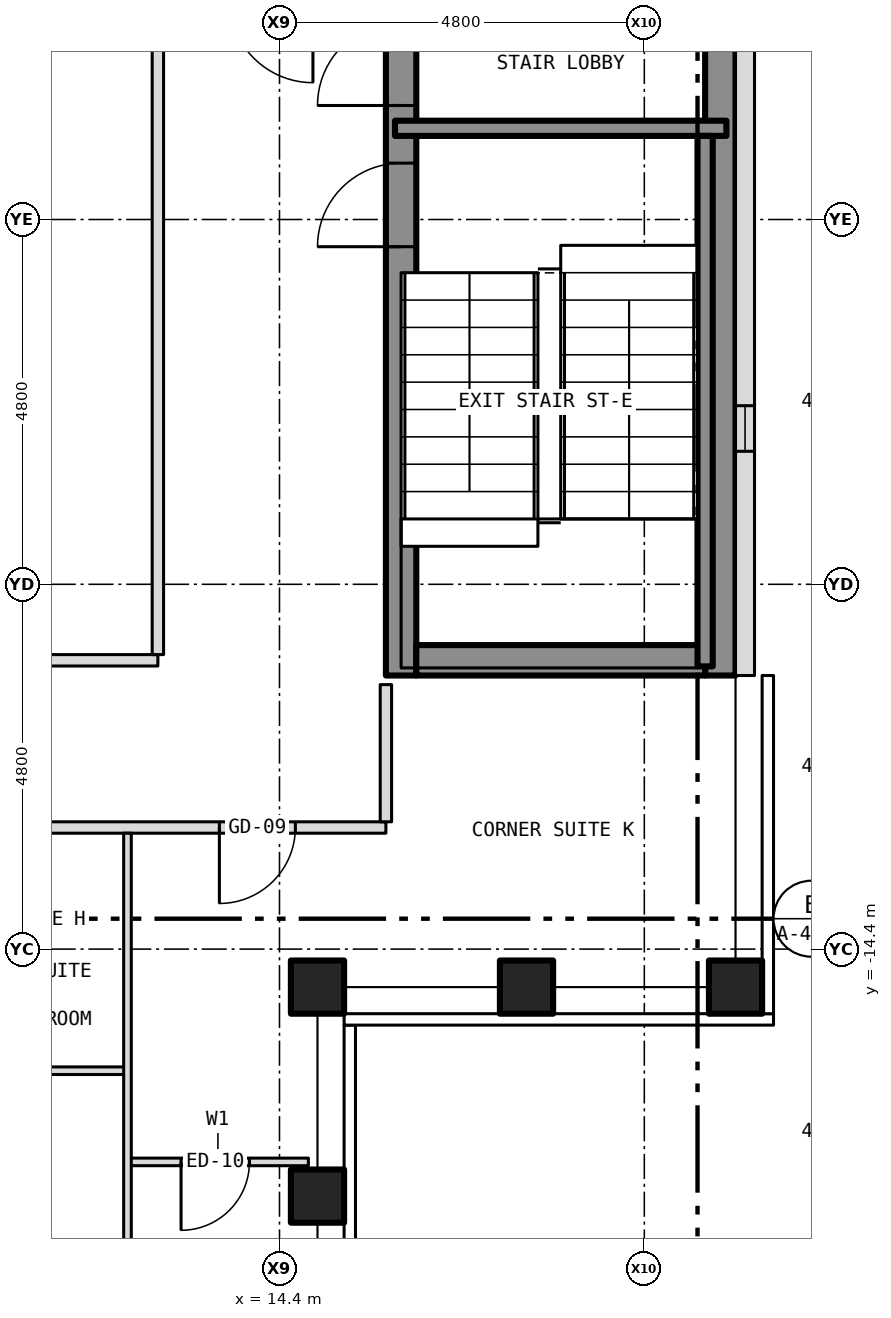
"""IFC4 building model, lengths in metres.
Left out: names, types, materials, properties, quantities, classifications, styles, units other than length and angle.
Written with IfcOpenShell. Run it as: python <this file> out.ifc"""

import sys

from ifc_helpers import new_model, si_unit, direction, frame, frame_2d, origin, origin_2d, place, context, subcontext, project, spatial, rectangle, hollow_rectangle, extrude, element, fill, save


model = new_model("IFC4")
c1 = context("Model", 3, precision=1e-05, world=origin(), true_north=direction((0.0, 1.0)))
c2 = subcontext(c1, "Body", "Model", "MODEL_VIEW")
j1 = project(units=[si_unit("LENGTHUNIT", "METRE"), si_unit("PLANEANGLEUNIT", "RADIAN")], contexts=[c1])
p1 = place(None, origin())
s1 = spatial("IfcSite", under=j1, at=p1, CompositionType="ELEMENT")
p2 = place(p1, origin())
s2 = spatial("IfcBuilding", under=s1, at=p2, CompositionType="ELEMENT")
p3 = place(p2, frame((0.0, 0.0, 212.0)))
s3 = spatial("IfcBuildingStorey", under=s2, at=p3, CompositionType="ELEMENT", Elevation=212.0)
for number, where, z_axis, x_axis in (
    (1, (20.4, -14.9, -0.15), (0.0, 0.0, 1.0), (1.0, 0.0, 0.0)),
    (2, (14.9, -14.9, -0.15), (0.0, 0.0, 1.0), (1.0, 0.0, 0.0)),
    (3, (14.9, -17.65, -0.15), (0.0, 0.0, 1.0), (1.0, 0.0, 0.0)),
    (4, (17.65, -14.9, -0.15), (0.0, 0.0, 1.0), (1.0, 0.0, 0.0)),
):
    element("IfcColumn", number, at=place(p3, frame(where, z_axis=z_axis, x_axis=x_axis)), inside=s3, PredefinedType="COLUMN", context=c2, shape_type="SweptSolid", body=[
        extrude(hollow_rectangle(XDim=0.7, YDim=0.7, WallThickness=0.04, at=origin_2d()), origin(), (0.0, 0.0, 1.0), 3.5),
    ])
p4 = place(p3, frame((16.0, -10.8, 0.0), z_axis=(0.0, 0.0, 1.0), x_axis=(0.0, 1.0, 0.0)))
e5 = element("IfcWall", 5, at=p4, inside=s3, PredefinedType="SHEAR", context=c2, shape_type="SweptSolid", body=[
    extrude(rectangle(XDim=21.6, YDim=0.4, at=frame_2d((10.8, 0.0))), origin(), (0.0, 0.0, 1.0), 3.25),
])
p5 = place(p4, frame((9.4, 0.0, 0.0)))
e6 = element("IfcOpeningElement", 6, at=p5, cuts=e5, PredefinedType="OPENING", context=c2, shape_type="SweptSolid", body=[
    extrude(rectangle(XDim=1.1, YDim=2.1, at=frame_2d((0.55, 1.05))), frame((0.0, 0.212, 0.0), z_axis=(0.0, -1.0, 0.0), x_axis=(1.0, 0.0, 0.0)), (0.0, 0.0, 1.0), 0.424),
])
p6 = place(p4, frame((11.5, 0.0, 0.0)))
e7 = element("IfcOpeningElement", 7, at=p6, cuts=e5, PredefinedType="OPENING", context=c2, shape_type="SweptSolid", body=[
    extrude(rectangle(XDim=1.1, YDim=2.1, at=frame_2d((0.55, 1.05))), frame((0.0, 0.212, 0.0), z_axis=(0.0, -1.0, 0.0), x_axis=(1.0, 0.0, 0.0)), (0.0, 0.0, 1.0), 0.424),
])
p7 = place(p4, frame((13.6, 0.0, 0.0)))
e8 = element("IfcOpeningElement", 8, at=p7, cuts=e5, PredefinedType="OPENING", context=c2, shape_type="SweptSolid", body=[
    extrude(rectangle(XDim=1.1, YDim=2.1, at=frame_2d((0.55, 1.05))), frame((0.0, 0.212, 0.0), z_axis=(0.0, -1.0, 0.0), x_axis=(1.0, 0.0, 0.0)), (0.0, 0.0, 1.0), 0.424),
])
p8 = place(p4, frame((15.7, 0.0, 0.0)))
e9 = element("IfcOpeningElement", 9, at=p8, cuts=e5, PredefinedType="OPENING", context=c2, shape_type="SweptSolid", body=[
    extrude(rectangle(XDim=1.1, YDim=2.1, at=frame_2d((0.55, 1.05))), frame((0.0, 0.212, 0.0), z_axis=(0.0, -1.0, 0.0), x_axis=(1.0, 0.0, 0.0)), (0.0, 0.0, 1.0), 0.424),
])
p9 = place(p4, frame((17.8, 0.0, 0.0)))
e10 = element("IfcOpeningElement", 10, at=p9, cuts=e5, PredefinedType="OPENING", context=c2, shape_type="SweptSolid", body=[
    extrude(rectangle(XDim=1.1, YDim=2.1, at=frame_2d((0.55, 1.05))), frame((0.0, 0.212, 0.0), z_axis=(0.0, -1.0, 0.0), x_axis=(1.0, 0.0, 0.0)), (0.0, 0.0, 1.0), 0.424),
])
p10 = place(p4, frame((5.642, 0.0, 0.0)))
e11 = element("IfcOpeningElement", 11, at=p10, cuts=e5, PredefinedType="OPENING", context=c2, shape_type="SweptSolid", body=[
    extrude(rectangle(XDim=1.1, YDim=2.1, at=frame_2d((0.55, 1.05))), frame((0.0, 0.212, 0.0), z_axis=(0.0, -1.0, 0.0), x_axis=(1.0, 0.0, 0.0)), (0.0, 0.0, 1.0), 0.424),
])
p11 = place(p4, frame((7.5, 0.0, 0.0)))
e12 = element("IfcOpeningElement", 12, at=p11, cuts=e5, PredefinedType="OPENING", context=c2, shape_type="SweptSolid", body=[
    extrude(rectangle(XDim=1.1, YDim=2.1, at=frame_2d((0.55, 1.05))), frame((0.0, 0.212, 0.0), z_axis=(0.0, -1.0, 0.0), x_axis=(1.0, 0.0, 0.0)), (0.0, 0.0, 1.0), 0.424),
])
p12 = place(p4, frame((20.0, 0.0, 0.0)))
e13 = element("IfcOpeningElement", 13, at=p12, cuts=e5, PredefinedType="OPENING", context=c2, shape_type="SweptSolid", body=[
    extrude(rectangle(XDim=0.9, YDim=2.1, at=frame_2d((0.45, 1.05))), frame((0.0, 0.212, 0.0), z_axis=(0.0, -1.0, 0.0), x_axis=(1.0, 0.0, 0.0)), (0.0, 0.0, 1.0), 0.424),
])
p13 = place(p3, frame((20.2, -10.8, 0.0), z_axis=(0.0, 0.0, 1.0), x_axis=(0.0, 1.0, 0.0)))
e14 = element("IfcWall", 14, at=p13, inside=s3, PredefinedType="SHEAR", context=c2, shape_type="SweptSolid", body=[
    extrude(rectangle(XDim=21.6, YDim=0.4, at=frame_2d((10.8, 0.0))), origin(), (0.0, 0.0, 1.0), 3.25),
])
p14 = place(p3, frame((16.2, -10.6, 0.0), z_axis=(0.0, 0.0, 1.0), x_axis=(1.0, 0.0, 0.0)))
e15 = element("IfcWall", 15, at=p14, inside=s3, PredefinedType="SHEAR", context=c2, shape_type="SweptSolid", body=[
    extrude(rectangle(XDim=3.8, YDim=0.4, at=frame_2d((1.9, 0.0))), origin(), (0.0, 0.0, 1.0), 3.25),
])
p15 = place(p3, frame((20.525, -10.8, 0.0), z_axis=(0.0, 0.0, 1.0), x_axis=(0.0, 1.0, 0.0)))
e16 = element("IfcWall", 16, at=p15, inside=s3, PredefinedType="SOLIDWALL", context=c2, shape_type="SweptSolid", body=[
    extrude(rectangle(XDim=21.6, YDim=0.25, at=frame_2d((10.8, 0.0))), origin(), (0.0, 0.0, 1.0), 3.5),
])
p16 = place(p15, frame((2.95, 0.0, 1.0)))
e17 = element("IfcOpeningElement", 17, at=p16, cuts=e16, PredefinedType="OPENING", context=c2, shape_type="SweptSolid", body=[
    extrude(rectangle(XDim=0.6, YDim=1.5, at=frame_2d((0.3, 0.75))), frame((0.0, 0.137, 0.0), z_axis=(0.0, -1.0, 0.0), x_axis=(1.0, 0.0, 0.0)), (0.0, 0.0, 1.0), 0.274),
])
p17 = place(p3, frame((12.4, -17.2, 0.0), z_axis=(0.0, 0.0, 1.0), x_axis=(1.0, 0.0, 0.0)))
e18 = element("IfcWall", 18, at=p17, inside=s3, PredefinedType="PARTITIONING", context=c2, shape_type="SweptSolid", body=[
    extrude(rectangle(XDim=2.38, YDim=0.1, at=frame_2d((1.19, 0.0))), origin(), (0.0, 0.0, 1.0), 3.35),
])
p18 = place(p17, frame((0.705, 0.0, 0.0)))
e19 = element("IfcOpeningElement", 19, at=p18, cuts=e18, PredefinedType="OPENING", context=c2, shape_type="SweptSolid", body=[
    extrude(rectangle(XDim=0.9, YDim=2.1, at=frame_2d((0.45, 1.05))), frame((0.0, 0.062, 0.0), z_axis=(0.0, -1.0, 0.0), x_axis=(1.0, 0.0, 0.0)), (0.0, 0.0, 1.0), 0.124),
])
p19 = place(p3, frame((10.2, -16.0, 0.0), z_axis=(0.0, 0.0, 1.0), x_axis=(1.0, 0.0, 0.0)))
e20 = element("IfcWall", 20, at=p19, inside=s3, PredefinedType="PARTITIONING", context=c2, shape_type="SweptSolid", body=[
    extrude(rectangle(XDim=2.2, YDim=0.1, at=frame_2d((1.1, 0.0))), origin(), (0.0, 0.0, 1.0), 3.35),
])
p20 = place(p3, frame((-15.8, -12.8, 0.0), z_axis=(0.0, 0.0, 1.0), x_axis=(1.0, 0.0, 0.0)))
e21 = element("IfcWall", 21, at=p20, inside=s3, PredefinedType="PARTITIONING", context=c2, shape_type="SweptSolid", body=[
    extrude(rectangle(XDim=31.6, YDim=0.15, at=frame_2d((15.8, 0.0))), origin(), (0.0, 0.0, 1.0), 3.35),
])
p21 = place(p20, frame((6.466, 0.0, 0.0)))
e22 = element("IfcOpeningElement", 22, at=p21, cuts=e21, PredefinedType="OPENING", context=c2, shape_type="SweptSolid", body=[
    extrude(rectangle(XDim=1.0, YDim=2.1, at=frame_2d((0.5, 1.05))), frame((0.0, 0.087, 0.0), z_axis=(0.0, -1.0, 0.0), x_axis=(1.0, 0.0, 0.0)), (0.0, 0.0, 1.0), 0.174),
])
p22 = place(p20, frame((15.548, 0.0, 0.0)))
e23 = element("IfcOpeningElement", 23, at=p22, cuts=e21, PredefinedType="OPENING", context=c2, shape_type="SweptSolid", body=[
    extrude(rectangle(XDim=1.0, YDim=2.1, at=frame_2d((0.5, 1.05))), frame((0.0, 0.087, 0.0), z_axis=(0.0, -1.0, 0.0), x_axis=(1.0, 0.0, 0.0)), (0.0, 0.0, 1.0), 0.174),
])
p23 = place(p20, frame((20.018, 0.0, 0.0)))
e24 = element("IfcOpeningElement", 24, at=p23, cuts=e21, PredefinedType="OPENING", context=c2, shape_type="SweptSolid", body=[
    extrude(rectangle(XDim=1.0, YDim=2.1, at=frame_2d((0.5, 1.05))), frame((0.0, 0.087, 0.0), z_axis=(0.0, -1.0, 0.0), x_axis=(1.0, 0.0, 0.0)), (0.0, 0.0, 1.0), 0.174),
])
p24 = place(p20, frame((1.192, 0.0, 0.0)))
e25 = element("IfcOpeningElement", 25, at=p24, cuts=e21, PredefinedType="OPENING", context=c2, shape_type="SweptSolid", body=[
    extrude(rectangle(XDim=1.0, YDim=2.1, at=frame_2d((0.5, 1.05))), frame((0.0, 0.087, 0.0), z_axis=(0.0, -1.0, 0.0), x_axis=(1.0, 0.0, 0.0)), (0.0, 0.0, 1.0), 0.174),
])
p25 = place(p20, frame((29.409, 0.0, 0.0)))
e26 = element("IfcOpeningElement", 26, at=p25, cuts=e21, PredefinedType="OPENING", context=c2, shape_type="SweptSolid", body=[
    extrude(rectangle(XDim=1.0, YDim=2.1, at=frame_2d((0.5, 1.05))), frame((0.0, 0.087, 0.0), z_axis=(0.0, -1.0, 0.0), x_axis=(1.0, 0.0, 0.0)), (0.0, 0.0, 1.0), 0.174),
])
p26 = place(p3, frame((3.3, -10.6, 0.0), z_axis=(0.0, 0.0, 1.0), x_axis=(1.0, 0.0, 0.0)))
e27 = element("IfcWall", 27, at=p26, inside=s3, PredefinedType="PARTITIONING", context=c2, shape_type="SweptSolid", body=[
    extrude(rectangle(XDim=9.5, YDim=0.15, at=frame_2d((4.75, 0.0))), origin(), (0.0, 0.0, 1.0), 3.35),
])
p27 = place(p3, frame((15.92, -3.6, 0.0), z_axis=(0.0, 0.0, 1.0), x_axis=(1.0, 0.0, 0.0)))
e28 = element("IfcWall", 28, at=p27, inside=s3, PredefinedType="SHEAR", context=c2, shape_type="SweptSolid", body=[
    extrude(rectangle(XDim=4.36, YDim=0.2, at=frame_2d((2.18, 0.0))), origin(), (0.0, 0.0, 1.0), 3.25),
])
p28 = place(p3, frame((12.4, -20.78, 0.0), z_axis=(0.0, 0.0, 1.0), x_axis=(0.0, 1.0, 0.0)))
e29 = element("IfcWall", 29, at=p28, inside=s3, PredefinedType="PARTITIONING", context=c2, shape_type="SweptSolid", body=[
    extrude(rectangle(XDim=7.905, YDim=0.1, at=frame_2d((3.953, 0.0))), origin(), (0.0, 0.0, 1.0), 3.35),
])
p29 = place(p3, frame((12.8, -10.525, 0.0), z_axis=(0.0, 0.0, 1.0), x_axis=(0.0, 1.0, 0.0)))
e30 = element("IfcWall", 30, at=p29, inside=s3, PredefinedType="PARTITIONING", context=c2, shape_type="SweptSolid", body=[
    extrude(rectangle(XDim=8.525, YDim=0.15, at=frame_2d((4.262, 0.0))), origin(), (0.0, 0.0, 1.0), 3.35),
])
p30 = place(p3, frame((15.8, -12.725, 0.0), z_axis=(0.0, 0.0, 1.0), x_axis=(0.0, 1.0, 0.0)))
e31 = element("IfcWall", 31, at=p30, inside=s3, PredefinedType="PARTITIONING", context=c2, shape_type="SweptSolid", body=[
    extrude(rectangle(XDim=1.805, YDim=0.15, at=frame_2d((0.903, 0.0))), origin(), (0.0, 0.0, 1.0), 3.35),
])
p31 = place(p3, frame((20.0, -10.68, 0.0), z_axis=(0.0, 0.0, 1.0), x_axis=(0.0, 1.0, 0.0)))
e32 = element("IfcWall", 32, at=p31, inside=s3, PredefinedType="SHEAR", context=c2, shape_type="SweptSolid", body=[
    extrude(rectangle(XDim=6.98, YDim=0.2, at=frame_2d((3.49, 0.0))), origin(), (0.0, 0.0, 1.0), 3.25),
])
p32 = place(p16, origin())
e33 = element("IfcWindow", 33, at=p32, inside=s3, PartitioningType="SINGLE_PANEL", PredefinedType="WINDOW", context=c2, shape_type="SweptSolid", body=[
    extrude(rectangle(XDim=0.6, YDim=1.5, at=frame_2d((0.3, 0.75))), frame((0.0, -0.035, 0.0), z_axis=(0.0, -1.0, 0.0), x_axis=(1.0, 0.0, 0.0)), (0.0, 0.0, 1.0), 0.06),
])
fill(e17, e33)
p33 = place(p10, origin())
e34 = element("IfcDoor", 34, at=p33, inside=s3, OperationType="SINGLE_SWING_LEFT", PredefinedType="DOOR", context=c2, shape_type="SweptSolid", body=[
    extrude(rectangle(XDim=1.1, YDim=2.1, at=frame_2d((0.55, 1.05))), frame((0.0, 0.025, 0.0), z_axis=(0.0, -1.0, 0.0), x_axis=(1.0, 0.0, 0.0)), (0.0, 0.0, 1.0), 0.05),
])
fill(e11, e34)
p34 = place(p11, origin())
e35 = element("IfcDoor", 35, at=p34, inside=s3, OperationType="SINGLE_SWING_LEFT", PredefinedType="DOOR", context=c2, shape_type="SweptSolid", body=[
    extrude(rectangle(XDim=1.1, YDim=2.1, at=frame_2d((0.55, 1.05))), frame((0.0, 0.025, 0.0), z_axis=(0.0, -1.0, 0.0), x_axis=(1.0, 0.0, 0.0)), (0.0, 0.0, 1.0), 0.05),
])
fill(e12, e35)
p35 = place(p18, origin())
e36 = element("IfcDoor", 36, at=p35, inside=s3, OperationType="SINGLE_SWING_LEFT", PredefinedType="DOOR", context=c2, shape_type="SweptSolid", body=[
    extrude(rectangle(XDim=0.9, YDim=2.1, at=frame_2d((0.45, 1.05))), frame((0.0, 0.025, 0.0), z_axis=(0.0, -1.0, 0.0), x_axis=(1.0, 0.0, 0.0)), (0.0, 0.0, 1.0), 0.05),
])
fill(e19, e36)
p36 = place(p25, origin())
e37 = element("IfcDoor", 37, at=p36, inside=s3, OperationType="SINGLE_SWING_LEFT", PredefinedType="DOOR", context=c2, shape_type="SweptSolid", body=[
    extrude(rectangle(XDim=1.0, YDim=2.1, at=frame_2d((0.5, 1.05))), frame((0.0, 0.025, 0.0), z_axis=(0.0, -1.0, 0.0), x_axis=(1.0, 0.0, 0.0)), (0.0, 0.0, 1.0), 0.05),
])
fill(e26, e37)
save(model, sys.argv[1])
